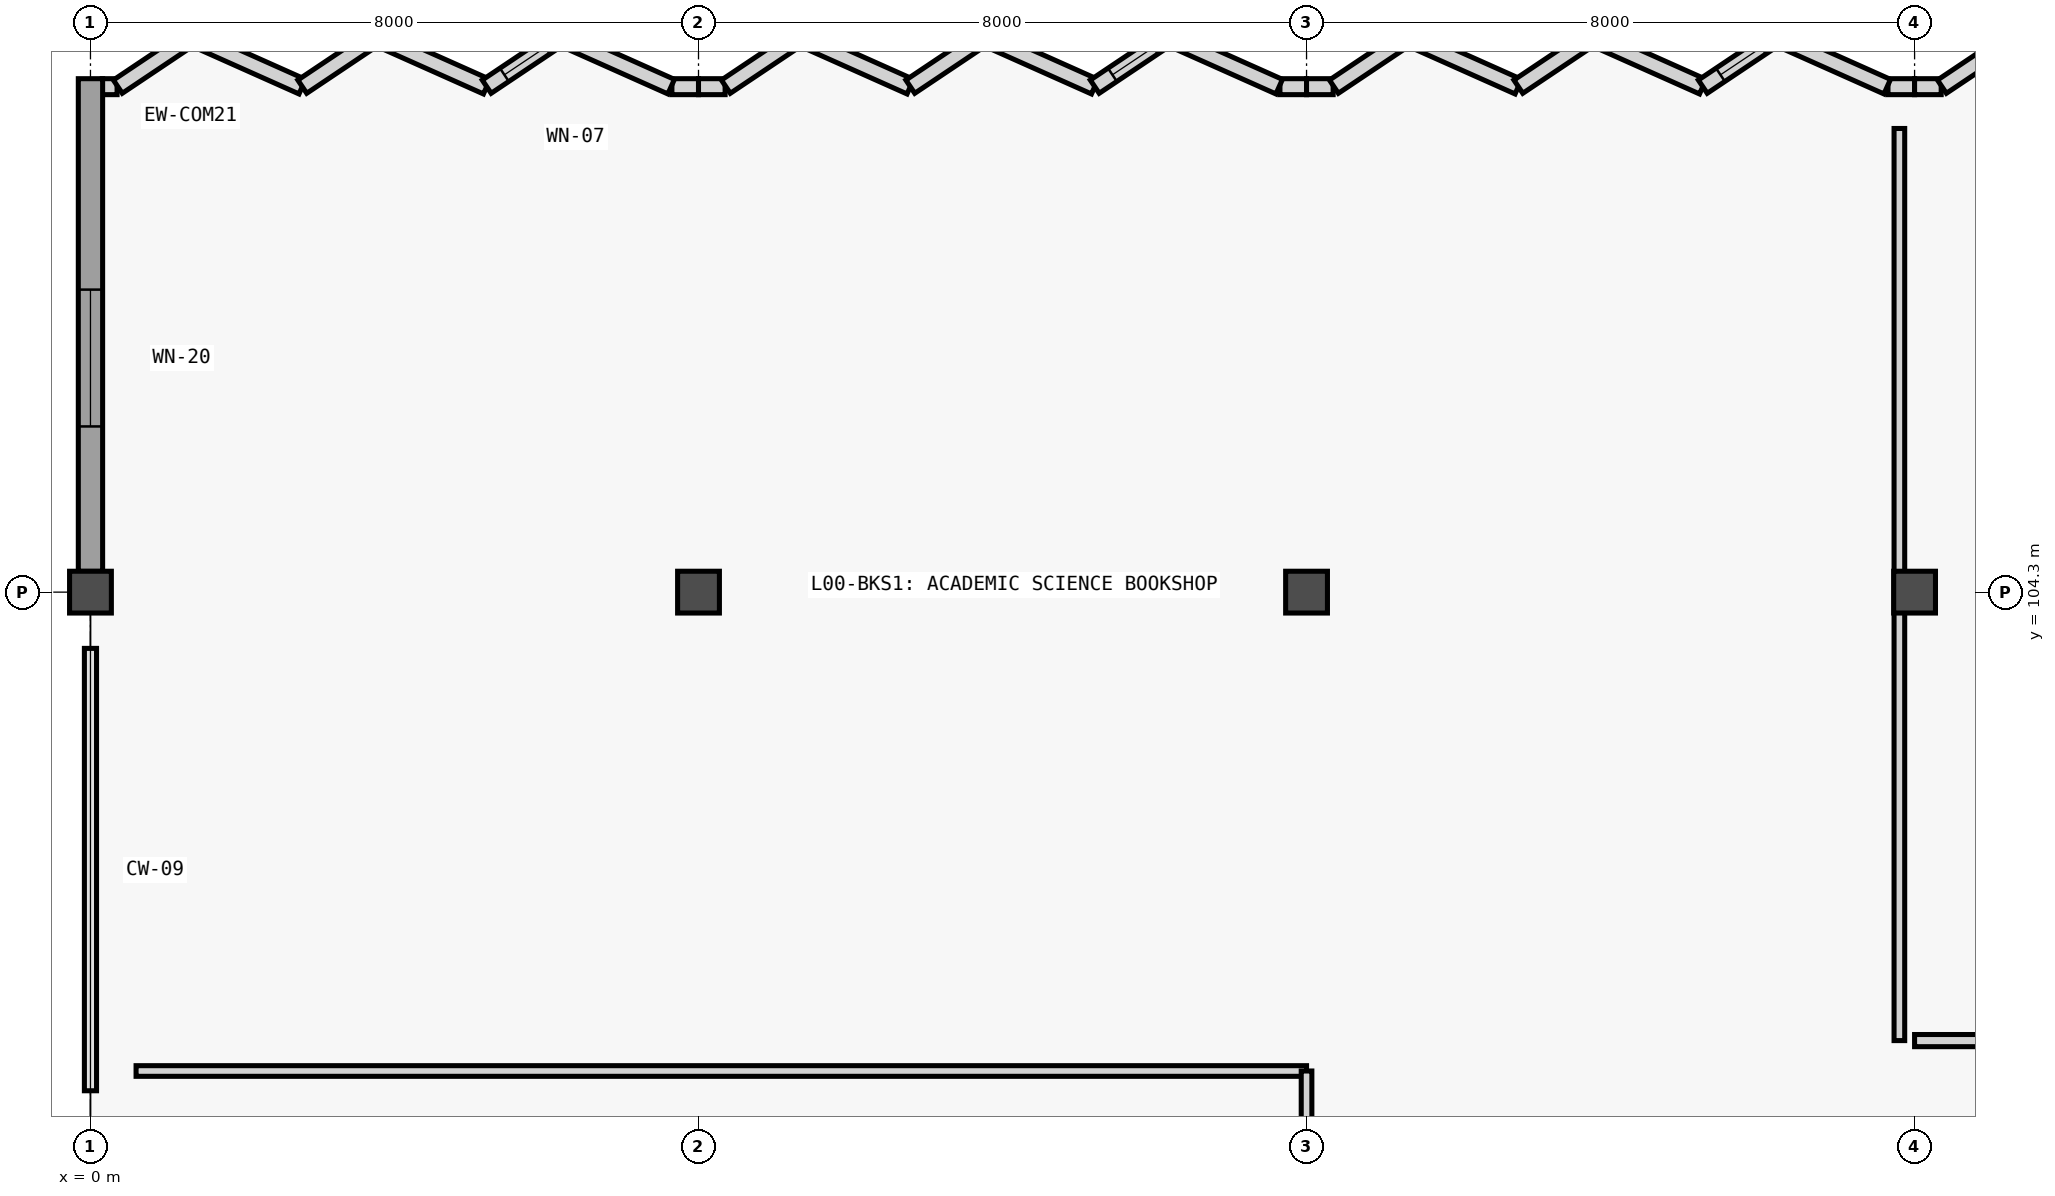
"""IFC4 building model, lengths in metres.
Left out: names, types, materials, properties, quantities, classifications, styles, units other than length and angle.
Written with IfcOpenShell. Run it as: python <this file> out.ifc"""

import sys

from ifc_helpers import new_model, si_unit, direction, frame, frame_2d, origin, origin_2d, place, context, subcontext, project, spatial, rectangle, extrude, element, fill, save


model = new_model("IFC4")
c1 = context("Model", 3, precision=1e-05, world=origin(), true_north=direction((0.0, 1.0)))
c2 = subcontext(c1, "Body", "Model", "MODEL_VIEW")
j1 = project(units=[si_unit("LENGTHUNIT", "METRE"), si_unit("PLANEANGLEUNIT", "RADIAN")], contexts=[c1])
p1 = place(None, origin())
s1 = spatial("IfcSite", under=j1, at=p1, CompositionType="ELEMENT")
p2 = place(p1, origin())
s2 = spatial("IfcBuilding", under=s1, at=p2, CompositionType="ELEMENT")
p3 = place(p2, origin())
s3 = spatial("IfcBuildingStorey", under=s2, at=p3, CompositionType="ELEMENT", Elevation=0.0)
for number, where, z_axis, x_axis in (
    (1, (0.0, 104.3, 0.0), (0.0, 0.0, 1.0), (1.0, 0.0, 0.0)),
    (2, (8.0, 104.3, 0.0), (0.0, 0.0, 1.0), (1.0, 0.0, 0.0)),
    (3, (16.0, 104.3, 0.0), (0.0, 0.0, 1.0), (1.0, 0.0, 0.0)),
    (4, (24.0, 104.3, 0.0), (0.0, 0.0, 1.0), (1.0, 0.0, 0.0)),
):
    element("IfcColumn", number, at=place(p3, frame(where, z_axis=z_axis, x_axis=x_axis)), inside=s3, PredefinedType="COLUMN", context=c2, shape_type="SweptSolid", body=[
        extrude(rectangle(XDim=0.55, YDim=0.55, at=origin_2d()), origin(), (0.0, 0.0, 1.0), 5.4),
    ])
p4 = place(p3, frame((0.155, 110.95, 0.0), z_axis=(0.0, 0.0, 1.0), x_axis=(1.0, 0.0, 0.0)))
e5 = element("IfcWall", 5, at=p4, inside=s3, PredefinedType="SOLIDWALL", context=c2, shape_type="SweptSolid", body=[
    extrude(rectangle(XDim=0.195, YDim=0.21, at=frame_2d((0.098, 0.0))), origin(), (0.0, 0.0, 1.0), 5.12),
])
for number, where, z_axis, x_axis in (
    (6, (7.65, 110.95, 0.0), (0.0, 0.0, 1.0), (1.0, 0.0, 0.0)),
    (7, (8.0, 110.95, 0.0), (0.0, 0.0, 1.0), (1.0, 0.0, 0.0)),
    (8, (15.65, 110.95, 0.0), (0.0, 0.0, 1.0), (1.0, 0.0, 0.0)),
    (9, (16.0, 110.95, 0.0), (0.0, 0.0, 1.0), (1.0, 0.0, 0.0)),
    (10, (23.65, 110.95, 0.0), (0.0, 0.0, 1.0), (1.0, 0.0, 0.0)),
    (11, (24.0, 110.95, 0.0), (0.0, 0.0, 1.0), (1.0, 0.0, 0.0)),
):
    element("IfcWall", number, at=place(p3, frame(where, z_axis=z_axis, x_axis=x_axis)), inside=s3, PredefinedType="SOLIDWALL", context=c2, shape_type="SweptSolid", body=[
        extrude(rectangle(XDim=0.35, YDim=0.21, at=frame_2d((0.175, 0.0))), origin(), (0.0, 0.0, 1.0), 5.12),
    ])
p5 = place(p3, frame((0.36, 110.95, 0.0), z_axis=(0.0, 0.0, 1.0), x_axis=(0.830858868059, 0.556483190553, 0.0)))
e12 = element("IfcWall", 12, at=p5, inside=s3, PredefinedType="SOLIDWALL", context=c2, shape_type="SweptSolid", body=[
    extrude(rectangle(XDim=1.168, YDim=0.21, at=frame_2d((0.584, 0.0))), origin(), (0.0, 0.0, 1.0), 5.12),
])
p6 = place(p3, frame((1.331, 111.6, 0.0), z_axis=(0.0, 0.0, 1.0), x_axis=(0.913083928543, -0.407771675618, 0.0)))
e13 = element("IfcWall", 13, at=p6, inside=s3, PredefinedType="SOLIDWALL", context=c2, shape_type="SweptSolid", body=[
    extrude(rectangle(XDim=1.594, YDim=0.21, at=frame_2d((0.797, 0.0))), origin(), (0.0, 0.0, 1.0), 5.12),
])
p7 = place(p3, frame((2.787, 110.95, 0.0), z_axis=(0.0, 0.0, 1.0), x_axis=(0.830858868059, 0.556483190553, 0.0)))
e14 = element("IfcWall", 14, at=p7, inside=s3, PredefinedType="SOLIDWALL", context=c2, shape_type="SweptSolid", body=[
    extrude(rectangle(XDim=1.168, YDim=0.21, at=frame_2d((0.584, 0.0))), origin(), (0.0, 0.0, 1.0), 5.12),
])
p8 = place(p3, frame((3.757, 111.6, 0.0), z_axis=(0.0, 0.0, 1.0), x_axis=(0.913109384471, -0.407714669826, 0.0)))
e15 = element("IfcWall", 15, at=p8, inside=s3, PredefinedType="SOLIDWALL", context=c2, shape_type="SweptSolid", body=[
    extrude(rectangle(XDim=1.595, YDim=0.21, at=frame_2d((0.797, 0.0))), origin(), (0.0, 0.0, 1.0), 5.12),
])
p9 = place(p3, frame((5.213, 110.95, 0.0), z_axis=(0.0, 0.0, 1.0), x_axis=(0.830858868059, 0.556483190553, 0.0)))
e16 = element("IfcWall", 16, at=p9, inside=s3, PredefinedType="SOLIDWALL", context=c2, shape_type="SweptSolid", body=[
    extrude(rectangle(XDim=1.168, YDim=0.21, at=frame_2d((0.584, 0.0))), origin(), (0.0, 0.0, 1.0), 5.12),
])
p10 = place(p9, frame((0.28, 0.0, 0.85)))
e17 = element("IfcOpeningElement", 17, at=p10, cuts=e16, PredefinedType="OPENING", context=c2, shape_type="SweptSolid", body=[
    extrude(rectangle(XDim=0.65, YDim=1.7, at=frame_2d((0.325, 0.85))), frame((0.0, 0.115, 0.0), z_axis=(0.0, -1.0, 0.0), x_axis=(1.0, 0.0, 0.0)), (0.0, 0.0, 1.0), 0.23),
])
p11 = place(p3, frame((6.184, 111.6, 0.0), z_axis=(0.0, 0.0, 1.0), x_axis=(0.913083928543, -0.407771675618, 0.0)))
e18 = element("IfcWall", 18, at=p11, inside=s3, PredefinedType="SOLIDWALL", context=c2, shape_type="SweptSolid", body=[
    extrude(rectangle(XDim=1.594, YDim=0.21, at=frame_2d((0.797, 0.0))), origin(), (0.0, 0.0, 1.0), 5.12),
])
p12 = place(p3, frame((8.36, 110.95, 0.0), z_axis=(0.0, 0.0, 1.0), x_axis=(0.830858868059, 0.556483190553, 0.0)))
e19 = element("IfcWall", 19, at=p12, inside=s3, PredefinedType="SOLIDWALL", context=c2, shape_type="SweptSolid", body=[
    extrude(rectangle(XDim=1.168, YDim=0.21, at=frame_2d((0.584, 0.0))), origin(), (0.0, 0.0, 1.0), 5.12),
])
p13 = place(p3, frame((9.331, 111.6, 0.0), z_axis=(0.0, 0.0, 1.0), x_axis=(0.913083928543, -0.407771675618, 0.0)))
e20 = element("IfcWall", 20, at=p13, inside=s3, PredefinedType="SOLIDWALL", context=c2, shape_type="SweptSolid", body=[
    extrude(rectangle(XDim=1.594, YDim=0.21, at=frame_2d((0.797, 0.0))), origin(), (0.0, 0.0, 1.0), 5.12),
])
p14 = place(p3, frame((10.787, 110.95, 0.0), z_axis=(0.0, 0.0, 1.0), x_axis=(0.830858868059, 0.556483190553, 0.0)))
e21 = element("IfcWall", 21, at=p14, inside=s3, PredefinedType="SOLIDWALL", context=c2, shape_type="SweptSolid", body=[
    extrude(rectangle(XDim=1.168, YDim=0.21, at=frame_2d((0.584, 0.0))), origin(), (0.0, 0.0, 1.0), 5.12),
])
p15 = place(p3, frame((11.757, 111.6, 0.0), z_axis=(0.0, 0.0, 1.0), x_axis=(0.913109384471, -0.407714669826, 0.0)))
e22 = element("IfcWall", 22, at=p15, inside=s3, PredefinedType="SOLIDWALL", context=c2, shape_type="SweptSolid", body=[
    extrude(rectangle(XDim=1.595, YDim=0.21, at=frame_2d((0.797, 0.0))), origin(), (0.0, 0.0, 1.0), 5.12),
])
p16 = place(p3, frame((13.213, 110.95, 0.0), z_axis=(0.0, 0.0, 1.0), x_axis=(0.830858868059, 0.556483190553, 0.0)))
e23 = element("IfcWall", 23, at=p16, inside=s3, PredefinedType="SOLIDWALL", context=c2, shape_type="SweptSolid", body=[
    extrude(rectangle(XDim=1.168, YDim=0.21, at=frame_2d((0.584, 0.0))), origin(), (0.0, 0.0, 1.0), 5.12),
])
p17 = place(p16, frame((0.28, 0.0, 0.85)))
e24 = element("IfcOpeningElement", 24, at=p17, cuts=e23, PredefinedType="OPENING", context=c2, shape_type="SweptSolid", body=[
    extrude(rectangle(XDim=0.65, YDim=1.7, at=frame_2d((0.325, 0.85))), frame((0.0, 0.115, 0.0), z_axis=(0.0, -1.0, 0.0), x_axis=(1.0, 0.0, 0.0)), (0.0, 0.0, 1.0), 0.23),
])
p18 = place(p3, frame((14.184, 111.6, 0.0), z_axis=(0.0, 0.0, 1.0), x_axis=(0.913083928543, -0.407771675618, 0.0)))
e25 = element("IfcWall", 25, at=p18, inside=s3, PredefinedType="SOLIDWALL", context=c2, shape_type="SweptSolid", body=[
    extrude(rectangle(XDim=1.594, YDim=0.21, at=frame_2d((0.797, 0.0))), origin(), (0.0, 0.0, 1.0), 5.12),
])
p19 = place(p3, frame((16.36, 110.95, 0.0), z_axis=(0.0, 0.0, 1.0), x_axis=(0.830858868059, 0.556483190553, 0.0)))
e26 = element("IfcWall", 26, at=p19, inside=s3, PredefinedType="SOLIDWALL", context=c2, shape_type="SweptSolid", body=[
    extrude(rectangle(XDim=1.168, YDim=0.21, at=frame_2d((0.584, 0.0))), origin(), (0.0, 0.0, 1.0), 5.12),
])
p20 = place(p3, frame((17.331, 111.6, 0.0), z_axis=(0.0, 0.0, 1.0), x_axis=(0.913083928543, -0.407771675618, 0.0)))
e27 = element("IfcWall", 27, at=p20, inside=s3, PredefinedType="SOLIDWALL", context=c2, shape_type="SweptSolid", body=[
    extrude(rectangle(XDim=1.594, YDim=0.21, at=frame_2d((0.797, 0.0))), origin(), (0.0, 0.0, 1.0), 5.12),
])
p21 = place(p3, frame((18.787, 110.95, 0.0), z_axis=(0.0, 0.0, 1.0), x_axis=(0.830858868059, 0.556483190553, 0.0)))
e28 = element("IfcWall", 28, at=p21, inside=s3, PredefinedType="SOLIDWALL", context=c2, shape_type="SweptSolid", body=[
    extrude(rectangle(XDim=1.168, YDim=0.21, at=frame_2d((0.584, 0.0))), origin(), (0.0, 0.0, 1.0), 5.12),
])
p22 = place(p3, frame((19.757, 111.6, 0.0), z_axis=(0.0, 0.0, 1.0), x_axis=(0.913109384471, -0.407714669826, 0.0)))
e29 = element("IfcWall", 29, at=p22, inside=s3, PredefinedType="SOLIDWALL", context=c2, shape_type="SweptSolid", body=[
    extrude(rectangle(XDim=1.595, YDim=0.21, at=frame_2d((0.797, 0.0))), origin(), (0.0, 0.0, 1.0), 5.12),
])
p23 = place(p3, frame((21.213, 110.95, 0.0), z_axis=(0.0, 0.0, 1.0), x_axis=(0.830858868059, 0.556483190553, 0.0)))
e30 = element("IfcWall", 30, at=p23, inside=s3, PredefinedType="SOLIDWALL", context=c2, shape_type="SweptSolid", body=[
    extrude(rectangle(XDim=1.168, YDim=0.21, at=frame_2d((0.584, 0.0))), origin(), (0.0, 0.0, 1.0), 5.12),
])
p24 = place(p23, frame((0.28, 0.0, 0.85)))
e31 = element("IfcOpeningElement", 31, at=p24, cuts=e30, PredefinedType="OPENING", context=c2, shape_type="SweptSolid", body=[
    extrude(rectangle(XDim=0.65, YDim=1.7, at=frame_2d((0.325, 0.85))), frame((0.0, 0.115, 0.0), z_axis=(0.0, -1.0, 0.0), x_axis=(1.0, 0.0, 0.0)), (0.0, 0.0, 1.0), 0.23),
])
p25 = place(p3, frame((22.184, 111.6, 0.0), z_axis=(0.0, 0.0, 1.0), x_axis=(0.913083928543, -0.407771675618, 0.0)))
e32 = element("IfcWall", 32, at=p25, inside=s3, PredefinedType="SOLIDWALL", context=c2, shape_type="SweptSolid", body=[
    extrude(rectangle(XDim=1.594, YDim=0.21, at=frame_2d((0.797, 0.0))), origin(), (0.0, 0.0, 1.0), 5.12),
])
p26 = place(p3, frame((24.36, 110.95, 0.0), z_axis=(0.0, 0.0, 1.0), x_axis=(0.830858868059, 0.556483190553, 0.0)))
e33 = element("IfcWall", 33, at=p26, inside=s3, PredefinedType="SOLIDWALL", context=c2, shape_type="SweptSolid", body=[
    extrude(rectangle(XDim=1.168, YDim=0.21, at=frame_2d((0.584, 0.0))), origin(), (0.0, 0.0, 1.0), 5.12),
])
p27 = place(p3, frame((0.0, 104.573, 0.0), z_axis=(0.0, 0.0, 1.0), x_axis=(0.0, 1.0, 0.0)))
e34 = element("IfcWall", 34, at=p27, inside=s3, PredefinedType="SOLIDWALL", context=c2, shape_type="SweptSolid", body=[
    extrude(rectangle(XDim=6.482, YDim=0.32, at=frame_2d((3.241, 0.0))), origin(), (0.0, 0.0, 1.0), 5.12),
])
p28 = place(p27, frame((1.907, 0.0, 0.9)))
e35 = element("IfcOpeningElement", 35, at=p28, cuts=e34, PredefinedType="OPENING", context=c2, shape_type="SweptSolid", body=[
    extrude(rectangle(XDim=1.8, YDim=1.55, at=frame_2d((0.9, 0.775))), frame((0.0, 0.17, 0.0), z_axis=(0.0, -1.0, 0.0), x_axis=(1.0, 0.0, 0.0)), (0.0, 0.0, 1.0), 0.34),
])
p29 = place(p3, frame((0.6, 98.0, 0.0), z_axis=(0.0, 0.0, 1.0), x_axis=(1.0, 0.0, 0.0)))
e36 = element("IfcWall", 36, at=p29, inside=s3, PredefinedType="PARTITIONING", context=c2, shape_type="SweptSolid", body=[
    extrude(rectangle(XDim=15.4, YDim=0.14, at=frame_2d((7.7, 0.0))), origin(), (0.0, 0.0, 1.0), 5.14),
])
p30 = place(p3, frame((16.0, 86.8, 0.0), z_axis=(0.0, 0.0, 1.0), x_axis=(0.0, 1.0, 0.0)))
e37 = element("IfcWall", 37, at=p30, inside=s3, PredefinedType="PARTITIONING", context=c2, shape_type="SweptSolid", body=[
    extrude(rectangle(XDim=11.2, YDim=0.14, at=frame_2d((5.6, 0.0))), origin(), (0.0, 0.0, 1.0), 4.39),
])
p31 = place(p30, frame((5.01, 0.0, 0.0)))
e38 = element("IfcOpeningElement", 38, at=p31, cuts=e37, PredefinedType="OPENING", context=c2, shape_type="SweptSolid", body=[
    extrude(rectangle(XDim=1.18, YDim=2.18, at=frame_2d((0.59, 1.09))), frame((0.0, 0.08, 0.0), z_axis=(0.0, -1.0, 0.0), x_axis=(1.0, 0.0, 0.0)), (0.0, 0.0, 1.0), 0.16),
])
p32 = place(p3, frame((23.8, 98.4, 0.0), z_axis=(0.0, 0.0, 1.0), x_axis=(0.0, 1.0, 0.0)))
e39 = element("IfcWall", 39, at=p32, inside=s3, PredefinedType="PARTITIONING", context=c2, shape_type="SweptSolid", body=[
    extrude(rectangle(XDim=12.0, YDim=0.14, at=frame_2d((6.0, 0.0))), origin(), (0.0, 0.0, 1.0), 4.49),
])
p33 = place(p3, frame((24.0, 98.4, 0.0), z_axis=(0.0, 0.0, 1.0), x_axis=(1.0, 0.0, 0.0)))
e40 = element("IfcWall", 40, at=p33, inside=s3, PredefinedType="PARTITIONING", context=c2, shape_type="SweptSolid", body=[
    extrude(rectangle(XDim=48.2, YDim=0.16, at=frame_2d((24.1, 0.0))), origin(), (0.0, 0.0, 1.0), 5.14),
])
p34 = place(p33, frame((0.849, 0.0, 0.0)))
e41 = element("IfcOpeningElement", 41, at=p34, cuts=e40, PredefinedType="OPENING", context=c2, shape_type="SweptSolid", body=[
    extrude(rectangle(XDim=1.9, YDim=2.3, at=frame_2d((0.95, 1.15))), frame((0.0, 0.09, 0.0), z_axis=(0.0, -1.0, 0.0), x_axis=(1.0, 0.0, 0.0)), (0.0, 0.0, 1.0), 0.18),
])
p35 = place(p10, origin())
e42 = element("IfcWindow", 42, at=p35, inside=s3, PartitioningType="SINGLE_PANEL", PredefinedType="WINDOW", context=c2, shape_type="SweptSolid", body=[
    extrude(rectangle(XDim=0.65, YDim=1.7, at=frame_2d((0.325, 0.85))), frame((0.0, 0.03, 0.0), z_axis=(0.0, -1.0, 0.0), x_axis=(1.0, 0.0, 0.0)), (0.0, 0.0, 1.0), 0.06),
])
fill(e17, e42)
p36 = place(p17, origin())
e43 = element("IfcWindow", 43, at=p36, inside=s3, PartitioningType="SINGLE_PANEL", PredefinedType="WINDOW", context=c2, shape_type="SweptSolid", body=[
    extrude(rectangle(XDim=0.65, YDim=1.7, at=frame_2d((0.325, 0.85))), frame((0.0, 0.03, 0.0), z_axis=(0.0, -1.0, 0.0), x_axis=(1.0, 0.0, 0.0)), (0.0, 0.0, 1.0), 0.06),
])
fill(e24, e43)
p37 = place(p24, origin())
e44 = element("IfcWindow", 44, at=p37, inside=s3, PartitioningType="SINGLE_PANEL", PredefinedType="WINDOW", context=c2, shape_type="SweptSolid", body=[
    extrude(rectangle(XDim=0.65, YDim=1.7, at=frame_2d((0.325, 0.85))), frame((0.0, 0.03, 0.0), z_axis=(0.0, -1.0, 0.0), x_axis=(1.0, 0.0, 0.0)), (0.0, 0.0, 1.0), 0.06),
])
fill(e31, e44)
p38 = place(p28, origin())
e45 = element("IfcWindow", 45, at=p38, inside=s3, PartitioningType="SINGLE_PANEL", PredefinedType="WINDOW", context=c2, shape_type="SweptSolid", body=[
    extrude(rectangle(XDim=1.8, YDim=1.55, at=frame_2d((0.9, 0.775))), frame((0.0, 0.03, 0.0), z_axis=(0.0, -1.0, 0.0), x_axis=(1.0, 0.0, 0.0)), (0.0, 0.0, 1.0), 0.06),
])
fill(e35, e45)
save(model, sys.argv[1])
